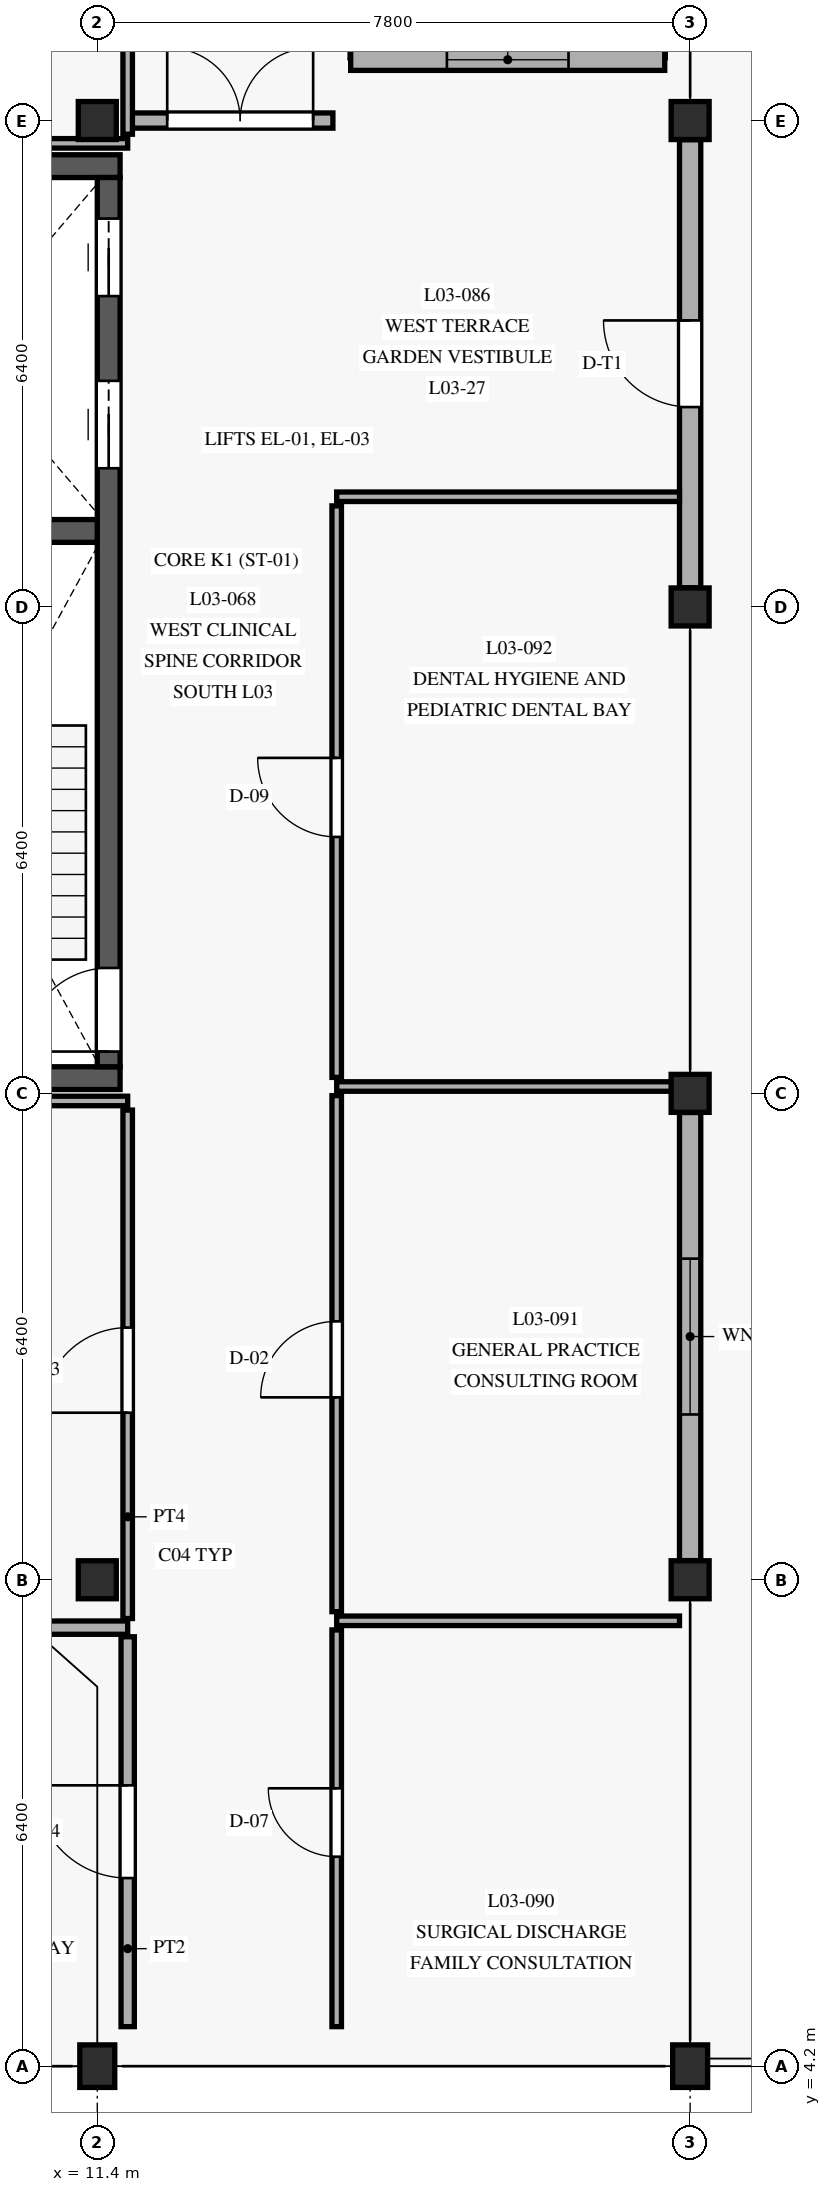
"""IFC4 building model, lengths in metres.
Left out: names, types, materials, properties, quantities, classifications, styles, units other than length and angle.
Written with IfcOpenShell. Run it as: python <this file> out.ifc"""

import sys

from ifc_helpers import new_model, si_unit, direction, frame, frame_2d, origin, origin_with_axes, origin_2d, place, context, subcontext, project, spatial, rectangle, extrude, element, fill, save


model = new_model("IFC4")
c1 = context("Model", 3, precision=1e-05, world=origin(), true_north=direction((0.0, 1.0)))
c2 = subcontext(c1, "Body", "Model", "MODEL_VIEW")
j1 = project(units=[si_unit("LENGTHUNIT", "METRE"), si_unit("PLANEANGLEUNIT", "RADIAN")], contexts=[c1])
p1 = place(None, origin())
s1 = spatial("IfcSite", under=j1, at=p1, CompositionType="ELEMENT")
p2 = place(p1, origin())
s2 = spatial("IfcBuilding", under=s1, at=p2, CompositionType="ELEMENT")
p3 = place(p2, frame((0.0, 0.0, 9.3)))
s3 = spatial("IfcBuildingStorey", under=s2, at=p3, CompositionType="ELEMENT", Elevation=9.3)
p4 = place(p3, frame((11.4, 4.2, 0.0), z_axis=(0.0, 0.0, 1.0), x_axis=(1.0, 0.0, 0.0)))
e1 = element("IfcColumn", 1, at=p4, inside=s3, PredefinedType="COLUMN", context=c2, shape_type="SweptSolid", body=[
    extrude(rectangle(XDim=0.46, YDim=0.56, at=origin_2d()), origin(), (0.0, 0.0, 1.0), 4.2),
])
for number, where, z_axis, x_axis in (
    (2, (11.4, 10.6, 0.0), (0.0, 0.0, 1.0), (1.0, 0.0, 0.0)),
    (3, (11.4, 29.8, 0.0), (0.0, 0.0, 1.0), (1.0, 0.0, 0.0)),
):
    element("IfcColumn", number, at=place(p3, frame(where, z_axis=z_axis, x_axis=x_axis)), inside=s3, PredefinedType="COLUMN", context=c2, shape_type="SweptSolid", body=[
        extrude(rectangle(XDim=0.5, YDim=0.5, at=origin_2d()), origin(), (0.0, 0.0, 1.0), 4.2),
    ])
p5 = place(p3, frame((19.2, 4.2, 0.0), z_axis=(0.0, 0.0, 1.0), x_axis=(1.0, 0.0, 0.0)))
e4 = element("IfcColumn", 4, at=p5, inside=s3, PredefinedType="COLUMN", context=c2, shape_type="SweptSolid", body=[
    extrude(rectangle(XDim=0.46, YDim=0.56, at=origin_2d()), origin(), (0.0, 0.0, 1.0), 4.2),
])
for number, where, z_axis, x_axis in (
    (5, (19.2, 10.6, 0.0), (0.0, 0.0, 1.0), (1.0, 0.0, 0.0)),
    (6, (19.2, 17.0, 0.0), (0.0, 0.0, 1.0), (1.0, 0.0, 0.0)),
    (7, (19.2, 23.4, 0.0), (0.0, 0.0, 1.0), (1.0, 0.0, 0.0)),
    (8, (19.2, 29.8, 0.0), (0.0, 0.0, 1.0), (1.0, 0.0, 0.0)),
):
    element("IfcColumn", number, at=place(p3, frame(where, z_axis=z_axis, x_axis=x_axis)), inside=s3, PredefinedType="COLUMN", context=c2, shape_type="SweptSolid", body=[
        extrude(rectangle(XDim=0.5, YDim=0.5, at=origin_2d()), origin(), (0.0, 0.0, 1.0), 4.2),
    ])
for number, where, z_axis, x_axis in (
    (9, (7.4, 17.2, 0.0), (0.0, 0.0, 1.0), (1.0, 0.0, 0.0)),
    (10, (11.7, 29.2, 0.0), (0.0, 0.0, 1.0), (-1.0, 0.0, 0.0)),
):
    element("IfcWall", number, at=place(p3, frame(where, z_axis=z_axis, x_axis=x_axis)), inside=s3, PredefinedType="SHEAR", context=c2, shape_type="SweptSolid", body=[
        extrude(rectangle(XDim=4.3, YDim=0.3, at=frame_2d((2.15, 0.0))), origin(), (0.0, 0.0, 1.0), 3.9),
    ])
p6 = place(p3, frame((11.55, 17.35, 0.0), z_axis=(0.0, 0.0, 1.0), x_axis=(0.0, 1.0, 0.0)))
e11 = element("IfcWall", 11, at=p6, inside=s3, PredefinedType="SHEAR", context=c2, shape_type="SweptSolid", body=[
    extrude(rectangle(XDim=11.7, YDim=0.3, at=frame_2d((5.85, 0.0))), origin(), (0.0, 0.0, 1.0), 3.9),
])
p7 = place(p6, frame((0.2, 0.0, 0.0)))
e12 = element("IfcOpeningElement", 12, at=p7, cuts=e11, PredefinedType="OPENING", context=c2, shape_type="SweptSolid", body=[
    extrude(rectangle(XDim=1.1, YDim=2.2, at=frame_2d((0.55, 1.1))), frame((0.0, 0.16, 0.0), z_axis=(0.0, -1.0, 0.0), x_axis=(1.0, 0.0, 0.0)), (0.0, 0.0, 1.0), 0.32),
])
p8 = place(p6, frame((7.875, 0.0, 0.0)))
e13 = element("IfcOpeningElement", 13, at=p8, cuts=e11, PredefinedType="OPENING", context=c2, shape_type="SweptSolid", body=[
    extrude(rectangle(XDim=1.15, YDim=2.2, at=frame_2d((0.575, 1.1))), frame((0.0, 0.16, 0.0), z_axis=(0.0, -1.0, 0.0), x_axis=(1.0, 0.0, 0.0)), (0.0, 0.0, 1.0), 0.32),
])
p9 = place(p6, frame((10.14, 0.0, 0.0)))
e14 = element("IfcOpeningElement", 14, at=p9, cuts=e11, PredefinedType="OPENING", context=c2, shape_type="SweptSolid", body=[
    extrude(rectangle(XDim=1.02, YDim=2.15, at=frame_2d((0.51, 1.075))), frame((0.0, 0.16, 0.0), z_axis=(0.0, -1.0, 0.0), x_axis=(1.0, 0.0, 0.0)), (0.0, 0.0, 1.0), 0.32),
])
p10 = place(p3, frame((7.7, 24.4, 0.0), z_axis=(0.0, 0.0, 1.0), x_axis=(1.0, 0.0, 0.0)))
e15 = element("IfcWall", 15, at=p10, inside=s3, PredefinedType="SHEAR", context=c2, shape_type="SweptSolid", body=[
    extrude(rectangle(XDim=3.7, YDim=0.3, at=frame_2d((1.85, 0.0))), origin(), (0.0, 0.0, 1.0), 3.9),
])
p11 = place(p3, frame((19.2, 10.852, 0.0), z_axis=(0.0, 0.0, 1.0), x_axis=(0.0, 1.0, 0.0)))
e16 = element("IfcWall", 16, at=p11, inside=s3, PredefinedType="SOLIDWALL", context=c2, shape_type="SweptSolid", body=[
    extrude(rectangle(XDim=5.896, YDim=0.28, at=frame_2d((2.948, 0.0))), origin(), (0.0, 0.0, 1.0), 3.57),
])
p12 = place(p11, frame((1.923, 0.0, 0.8)))
e17 = element("IfcOpeningElement", 17, at=p12, cuts=e16, PredefinedType="OPENING", context=c2, shape_type="SweptSolid", body=[
    extrude(rectangle(XDim=2.05, YDim=1.95, at=frame_2d((1.025, 0.975))), frame((0.0, 0.15, 0.0), z_axis=(0.0, -1.0, 0.0), x_axis=(1.0, 0.0, 0.0)), (0.0, 0.0, 1.0), 0.3),
])
p13 = place(p3, frame((19.2, 23.652, 0.0), z_axis=(0.0, 0.0, 1.0), x_axis=(0.0, 1.0, 0.0)))
e18 = element("IfcWall", 18, at=p13, inside=s3, PredefinedType="SOLIDWALL", context=c2, shape_type="SweptSolid", body=[
    extrude(rectangle(XDim=5.896, YDim=0.28, at=frame_2d((2.948, 0.0))), origin(), (0.0, 0.0, 1.0), 3.57),
])
p14 = place(p13, frame((2.378, 0.0, 0.0)))
e19 = element("IfcOpeningElement", 19, at=p14, cuts=e18, PredefinedType="OPENING", context=c2, shape_type="SweptSolid", body=[
    extrude(rectangle(XDim=1.14, YDim=2.3, at=frame_2d((0.57, 1.15))), frame((0.0, 0.15, 0.0), z_axis=(0.0, -1.0, 0.0), x_axis=(1.0, 0.0, 0.0)), (0.0, 0.0, 1.0), 0.3),
])
p15 = place(p3, frame((18.866, 30.6, 0.0), z_axis=(0.0, 0.0, 1.0), x_axis=(-1.0, 0.0, 0.0)))
e20 = element("IfcWall", 20, at=p15, inside=s3, PredefinedType="SOLIDWALL", context=c2, shape_type="SweptSolid", body=[
    extrude(rectangle(XDim=4.132, YDim=0.28, at=frame_2d((2.066, 0.0))), origin(), (0.0, 0.0, 1.0), 3.9),
])
p16 = place(p15, frame((1.266, 0.0, 0.85)))
e21 = element("IfcOpeningElement", 21, at=p16, cuts=e20, PredefinedType="OPENING", context=c2, shape_type="SweptSolid", body=[
    extrude(rectangle(XDim=1.6, YDim=1.8, at=frame_2d((0.8, 0.9))), frame((0.0, 0.15, 0.0), z_axis=(0.0, -1.0, 0.0), x_axis=(1.0, 0.0, 0.0)), (0.0, 0.0, 1.0), 0.3),
])
p17 = place(p3, frame((11.85, 29.8, 0.0), z_axis=(0.0, 0.0, 1.0), x_axis=(1.0, 0.0, 0.0)))
e22 = element("IfcWall", 22, at=p17, inside=s3, PredefinedType="PARTITIONING", context=c2, shape_type="SweptSolid", body=[
    extrude(rectangle(XDim=2.65, YDim=0.2, at=frame_2d((1.325, 0.0))), origin(), (0.0, 0.0, 1.0), 3.495),
])
p18 = place(p17, frame((0.47, 0.0, 0.0)))
e23 = element("IfcOpeningElement", 23, at=p18, cuts=e22, PredefinedType="OPENING", context=c2, shape_type="SweptSolid", body=[
    extrude(rectangle(XDim=1.92, YDim=2.3, at=frame_2d((0.96, 1.15))), frame((0.0, 0.11, 0.0), z_axis=(0.0, -1.0, 0.0), x_axis=(1.0, 0.0, 0.0)), (0.0, 0.0, 1.0), 0.22),
])
p19 = place(p3, frame((11.8, 4.72, 0.0), z_axis=(0.0, 0.0, 1.0), x_axis=(0.0, 1.0, 0.0)))
e24 = element("IfcWall", 24, at=p19, inside=s3, PredefinedType="PARTITIONING", context=c2, shape_type="SweptSolid", body=[
    extrude(rectangle(XDim=5.13, YDim=0.175, at=frame_2d((2.565, 0.0))), origin(), (0.0, 0.0, 1.0), 3.895),
])
p20 = place(p19, frame((1.955, 0.0, 0.0)))
e25 = element("IfcOpeningElement", 25, at=p20, cuts=e24, PredefinedType="OPENING", context=c2, shape_type="SweptSolid", body=[
    extrude(rectangle(XDim=1.22, YDim=2.2, at=frame_2d((0.61, 1.1))), frame((0.0, 0.098, 0.0), z_axis=(0.0, -1.0, 0.0), x_axis=(1.0, 0.0, 0.0)), (0.0, 0.0, 1.0), 0.195),
])
p21 = place(p3, frame((4.34, 9.97, 0.0), z_axis=(0.0, 0.0, 1.0), x_axis=(1.0, 0.0, 0.0)))
e26 = element("IfcWall", 26, at=p21, inside=s3, PredefinedType="PARTITIONING", context=c2, shape_type="SweptSolid", body=[
    extrude(rectangle(XDim=7.46, YDim=0.175, at=frame_2d((3.73, 0.0))), origin(), (0.0, 0.0, 1.0), 3.475),
])
p22 = place(p3, frame((11.8, 10.09, 0.0), z_axis=(0.0, 0.0, 1.0), x_axis=(0.0, 1.0, 0.0)))
e27 = element("IfcWall", 27, at=p22, inside=s3, PredefinedType="PARTITIONING", context=c2, shape_type="SweptSolid", body=[
    extrude(rectangle(XDim=6.69, YDim=0.125, at=frame_2d((3.345, 0.0))), origin(), (0.0, 0.0, 1.0), 3.495),
])
p23 = place(p22, frame((2.708, 0.0, 0.0)))
e28 = element("IfcOpeningElement", 28, at=p23, cuts=e27, PredefinedType="OPENING", context=c2, shape_type="SweptSolid", body=[
    extrude(rectangle(XDim=1.12, YDim=2.2, at=frame_2d((0.56, 1.1))), frame((0.0, 0.073, 0.0), z_axis=(0.0, -1.0, 0.0), x_axis=(1.0, 0.0, 0.0)), (0.0, 0.0, 1.0), 0.145),
])
p24 = place(p3, frame((4.34, 16.9, 0.0), z_axis=(0.0, 0.0, 1.0), x_axis=(1.0, 0.0, 0.0)))
e29 = element("IfcWall", 29, at=p24, inside=s3, PredefinedType="PARTITIONING", context=c2, shape_type="SweptSolid", body=[
    extrude(rectangle(XDim=7.46, YDim=0.125, at=frame_2d((3.73, 0.0))), origin(), (0.0, 0.0, 1.0), 3.495),
])
p25 = place(p3, frame((11.8, 29.62, 0.0), z_axis=(0.0, 0.0, 1.0), x_axis=(0.0, 1.0, 0.0)))
e30 = element("IfcWall", 30, at=p25, inside=s3, PredefinedType="PARTITIONING", context=c2, shape_type="SweptSolid", body=[
    extrude(rectangle(XDim=6.68, YDim=0.125, at=frame_2d((3.34, 0.0))), origin(), (0.0, 0.0, 1.0), 3.495),
])
p26 = place(p25, frame((2.88, 0.0, 0.0)))
e31 = element("IfcOpeningElement", 31, at=p26, cuts=e30, PredefinedType="OPENING", context=c2, shape_type="SweptSolid", body=[
    extrude(rectangle(XDim=0.92, YDim=2.15, at=frame_2d((0.46, 1.075))), frame((0.0, 0.073, 0.0), z_axis=(0.0, -1.0, 0.0), x_axis=(1.0, 0.0, 0.0)), (0.0, 0.0, 1.0), 0.145),
])
p27 = place(p3, frame((4.34, 29.5, 0.0), z_axis=(0.0, 0.0, 1.0), x_axis=(1.0, 0.0, 0.0)))
e32 = element("IfcWall", 32, at=p27, inside=s3, PredefinedType="PARTITIONING", context=c2, shape_type="SweptSolid", body=[
    extrude(rectangle(XDim=7.46, YDim=0.125, at=frame_2d((3.73, 0.0))), origin(), (0.0, 0.0, 1.0), 3.475),
])
p28 = place(p3, frame((14.55, 4.72, 0.0), z_axis=(0.0, 0.0, 1.0), x_axis=(0.0, 1.0, 0.0)))
e33 = element("IfcWall", 33, at=p28, inside=s3, PredefinedType="PARTITIONING", context=c2, shape_type="SweptSolid", body=[
    extrude(rectangle(XDim=5.22, YDim=0.125, at=frame_2d((2.61, 0.0))), origin(), (0.0, 0.0, 1.0), 3.895),
])
p29 = place(p28, frame((2.236, 0.0, 0.0)))
e34 = element("IfcOpeningElement", 34, at=p29, cuts=e33, PredefinedType="OPENING", context=c2, shape_type="SweptSolid", body=[
    extrude(rectangle(XDim=0.9, YDim=2.12, at=frame_2d((0.45, 1.06))), frame((0.0, 0.073, 0.0), z_axis=(0.0, -1.0, 0.0), x_axis=(1.0, 0.0, 0.0)), (0.0, 0.0, 1.0), 0.145),
])
p30 = place(p3, frame((14.55, 10.06, 0.0), z_axis=(0.0, 0.0, 1.0), x_axis=(1.0, 0.0, 0.0)))
e35 = element("IfcWall", 35, at=p30, inside=s3, PredefinedType="PARTITIONING", context=c2, shape_type="SweptSolid", body=[
    extrude(rectangle(XDim=4.51, YDim=0.125, at=frame_2d((2.255, 0.0))), origin(), (0.0, 0.0, 1.0), 3.565),
])
p31 = place(p3, frame((14.55, 10.18, 0.0), z_axis=(0.0, 0.0, 1.0), x_axis=(0.0, 1.0, 0.0)))
e36 = element("IfcWall", 36, at=p31, inside=s3, PredefinedType="PARTITIONING", context=c2, shape_type="SweptSolid", body=[
    extrude(rectangle(XDim=6.79, YDim=0.125, at=frame_2d((3.395, 0.0))), origin(), (0.0, 0.0, 1.0), 3.495),
])
p32 = place(p31, frame((2.82, 0.0, 0.0)))
e37 = element("IfcOpeningElement", 37, at=p32, cuts=e36, PredefinedType="OPENING", context=c2, shape_type="SweptSolid", body=[
    extrude(rectangle(XDim=1.0, YDim=2.15, at=frame_2d((0.5, 1.075))), frame((0.0, 0.073, 0.0), z_axis=(0.0, -1.0, 0.0), x_axis=(1.0, 0.0, 0.0)), (0.0, 0.0, 1.0), 0.145),
])
p33 = place(p3, frame((14.55, 17.09, 0.0), z_axis=(0.0, 0.0, 1.0), x_axis=(1.0, 0.0, 0.0)))
e38 = element("IfcWall", 38, at=p33, inside=s3, PredefinedType="PARTITIONING", context=c2, shape_type="SweptSolid", body=[
    extrude(rectangle(XDim=4.51, YDim=0.125, at=frame_2d((2.255, 0.0))), origin(), (0.0, 0.0, 1.0), 3.495),
])
p34 = place(p3, frame((14.55, 17.21, 0.0), z_axis=(0.0, 0.0, 1.0), x_axis=(0.0, 1.0, 0.0)))
e39 = element("IfcWall", 39, at=p34, inside=s3, PredefinedType="PARTITIONING", context=c2, shape_type="SweptSolid", body=[
    extrude(rectangle(XDim=7.52, YDim=0.125, at=frame_2d((3.76, 0.0))), origin(), (0.0, 0.0, 1.0), 3.495),
])
p35 = place(p34, frame((3.164, 0.0, 0.0)))
e40 = element("IfcOpeningElement", 40, at=p35, cuts=e39, PredefinedType="OPENING", context=c2, shape_type="SweptSolid", body=[
    extrude(rectangle(XDim=1.04, YDim=2.15, at=frame_2d((0.52, 1.075))), frame((0.0, 0.073, 0.0), z_axis=(0.0, -1.0, 0.0), x_axis=(1.0, 0.0, 0.0)), (0.0, 0.0, 1.0), 0.145),
])
p36 = place(p3, frame((14.55, 24.85, 0.0), z_axis=(0.0, 0.0, 1.0), x_axis=(1.0, 0.0, 0.0)))
e41 = element("IfcWall", 41, at=p36, inside=s3, PredefinedType="PARTITIONING", context=c2, shape_type="SweptSolid", body=[
    extrude(rectangle(XDim=4.51, YDim=0.125, at=frame_2d((2.255, 0.0))), origin(), (0.0, 0.0, 1.0), 3.565),
])
p37 = place(p7, origin_with_axes())
e42 = element("IfcDoor", 42, at=p37, inside=s3, OperationType="SINGLE_SWING_LEFT", PredefinedType="DOOR", context=c2, shape_type="SweptSolid", body=[
    extrude(rectangle(XDim=1.1, YDim=2.2, at=frame_2d((0.55, 1.1))), frame((0.0, 0.025, 0.0), z_axis=(0.0, -1.0, 0.0), x_axis=(1.0, 0.0, 0.0)), (0.0, 0.0, 1.0), 0.05),
])
fill(e12, e42)
p38 = place(p8, origin_with_axes())
e43 = element("IfcDoor", 43, at=p38, inside=s3, OperationType="SLIDING_TO_LEFT", PredefinedType="DOOR", context=c2, shape_type="SweptSolid", body=[
    extrude(rectangle(XDim=1.15, YDim=2.2, at=frame_2d((0.575, 1.1))), frame((0.0, 0.025, 0.0), z_axis=(0.0, -1.0, 0.0), x_axis=(1.0, 0.0, 0.0)), (0.0, 0.0, 1.0), 0.05),
])
fill(e13, e43)
p39 = place(p9, origin_with_axes())
e44 = element("IfcDoor", 44, at=p39, inside=s3, OperationType="SLIDING_TO_LEFT", PredefinedType="DOOR", context=c2, shape_type="SweptSolid", body=[
    extrude(rectangle(XDim=1.02, YDim=2.15, at=frame_2d((0.51, 1.075))), frame((0.0, 0.025, 0.0), z_axis=(0.0, -1.0, 0.0), x_axis=(1.0, 0.0, 0.0)), (0.0, 0.0, 1.0), 0.05),
])
fill(e14, e44)
p40 = place(p12, origin_with_axes())
e45 = element("IfcWindow", 45, at=p40, inside=s3, PartitioningType="SINGLE_PANEL", PredefinedType="WINDOW", context=c2, shape_type="SweptSolid", body=[
    extrude(rectangle(XDim=2.05, YDim=1.95, at=frame_2d((1.025, 0.975))), frame((0.0, 0.03, 0.0), z_axis=(0.0, -1.0, 0.0), x_axis=(1.0, 0.0, 0.0)), (0.0, 0.0, 1.0), 0.06),
])
fill(e17, e45)
p41 = place(p14, frame((1.14, 0.0, 0.0), z_axis=(0.0, 0.0, 1.0), x_axis=(-1.0, 0.0, 0.0)))
e46 = element("IfcDoor", 46, at=p41, inside=s3, OperationType="SINGLE_SWING_LEFT", PredefinedType="DOOR", context=c2, shape_type="SweptSolid", body=[
    extrude(rectangle(XDim=1.14, YDim=2.3, at=frame_2d((0.57, 1.15))), frame((0.0, 0.025, 0.0), z_axis=(0.0, -1.0, 0.0), x_axis=(1.0, 0.0, 0.0)), (0.0, 0.0, 1.0), 0.05),
])
fill(e19, e46)
p42 = place(p16, origin_with_axes())
e47 = element("IfcWindow", 47, at=p42, inside=s3, PartitioningType="SINGLE_PANEL", PredefinedType="WINDOW", context=c2, shape_type="SweptSolid", body=[
    extrude(rectangle(XDim=1.6, YDim=1.8, at=frame_2d((0.8, 0.9))), frame((0.0, 0.03, 0.0), z_axis=(0.0, -1.0, 0.0), x_axis=(1.0, 0.0, 0.0)), (0.0, 0.0, 1.0), 0.06),
])
fill(e21, e47)
p43 = place(p18, origin_with_axes())
e48 = element("IfcDoor", 48, at=p43, inside=s3, OperationType="DOUBLE_DOOR_DOUBLE_SWING", PredefinedType="DOOR", context=c2, shape_type="SweptSolid", body=[
    extrude(rectangle(XDim=1.92, YDim=2.3, at=frame_2d((0.96, 1.15))), frame((0.0, 0.025, 0.0), z_axis=(0.0, -1.0, 0.0), x_axis=(1.0, 0.0, 0.0)), (0.0, 0.0, 1.0), 0.05),
])
fill(e23, e48)
p44 = place(p20, origin_with_axes())
e49 = element("IfcDoor", 49, at=p44, inside=s3, OperationType="SINGLE_SWING_RIGHT", PredefinedType="DOOR", context=c2, shape_type="SweptSolid", body=[
    extrude(rectangle(XDim=1.22, YDim=2.2, at=frame_2d((0.61, 1.1))), frame((0.0, 0.025, 0.0), z_axis=(0.0, -1.0, 0.0), x_axis=(1.0, 0.0, 0.0)), (0.0, 0.0, 1.0), 0.05),
])
fill(e25, e49)
p45 = place(p23, origin_with_axes())
e50 = element("IfcDoor", 50, at=p45, inside=s3, OperationType="SINGLE_SWING_LEFT", PredefinedType="DOOR", context=c2, shape_type="SweptSolid", body=[
    extrude(rectangle(XDim=1.12, YDim=2.2, at=frame_2d((0.56, 1.1))), frame((0.0, 0.025, 0.0), z_axis=(0.0, -1.0, 0.0), x_axis=(1.0, 0.0, 0.0)), (0.0, 0.0, 1.0), 0.05),
])
fill(e28, e50)
p46 = place(p29, frame((0.9, 0.0, 0.0), z_axis=(0.0, 0.0, 1.0), x_axis=(-1.0, 0.0, 0.0)))
e51 = element("IfcDoor", 51, at=p46, inside=s3, OperationType="SINGLE_SWING_LEFT", PredefinedType="DOOR", context=c2, shape_type="SweptSolid", body=[
    extrude(rectangle(XDim=0.9, YDim=2.12, at=frame_2d((0.45, 1.06))), frame((0.0, 0.025, 0.0), z_axis=(0.0, -1.0, 0.0), x_axis=(1.0, 0.0, 0.0)), (0.0, 0.0, 1.0), 0.05),
])
fill(e34, e51)
p47 = place(p32, frame((1.0, 0.0, 0.0), z_axis=(0.0, 0.0, 1.0), x_axis=(-1.0, 0.0, 0.0)))
e52 = element("IfcDoor", 52, at=p47, inside=s3, OperationType="SINGLE_SWING_RIGHT", PredefinedType="DOOR", context=c2, shape_type="SweptSolid", body=[
    extrude(rectangle(XDim=1.0, YDim=2.15, at=frame_2d((0.5, 1.075))), frame((0.0, 0.025, 0.0), z_axis=(0.0, -1.0, 0.0), x_axis=(1.0, 0.0, 0.0)), (0.0, 0.0, 1.0), 0.05),
])
fill(e37, e52)
p48 = place(p35, frame((1.04, 0.0, 0.0), z_axis=(0.0, 0.0, 1.0), x_axis=(-1.0, 0.0, 0.0)))
e53 = element("IfcDoor", 53, at=p48, inside=s3, OperationType="SINGLE_SWING_LEFT", PredefinedType="DOOR", context=c2, shape_type="SweptSolid", body=[
    extrude(rectangle(XDim=1.04, YDim=2.15, at=frame_2d((0.52, 1.075))), frame((0.0, 0.025, 0.0), z_axis=(0.0, -1.0, 0.0), x_axis=(1.0, 0.0, 0.0)), (0.0, 0.0, 1.0), 0.05),
])
fill(e40, e53)
save(model, sys.argv[1])
